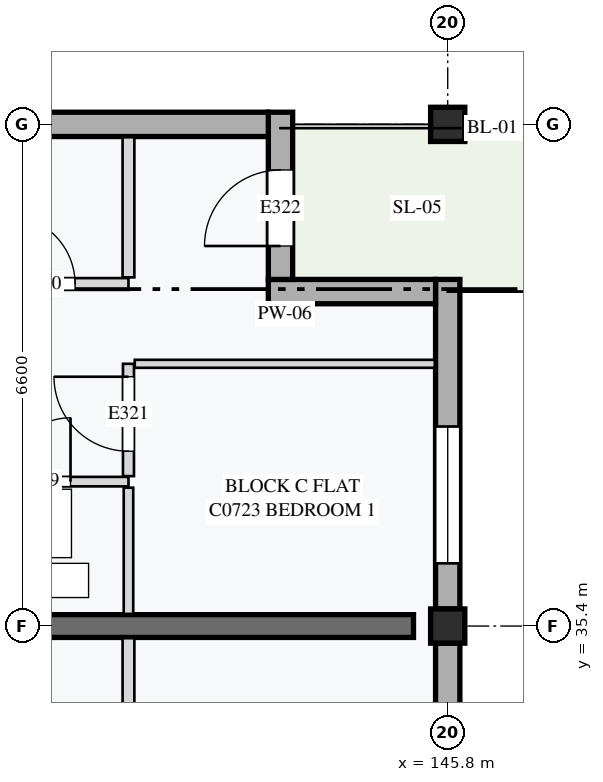
"""IFC4 building model, lengths in metres.
Left out: names, types, materials, properties, quantities, classifications, styles, units other than length and angle.
Written with IfcOpenShell. Run it as: python <this file> out.ifc"""

import sys

from ifc_helpers import new_model, si_unit, direction, frame, frame_2d, origin, origin_2d, place, context, subcontext, project, spatial, rectangle, extrude, element, fill, save


model = new_model("IFC4")
c1 = context("Model", 3, precision=1e-05, world=origin(), true_north=direction((0.0, 1.0)))
c2 = subcontext(c1, "Body", "Model", "MODEL_VIEW")
j1 = project(units=[si_unit("LENGTHUNIT", "METRE"), si_unit("PLANEANGLEUNIT", "RADIAN")], contexts=[c1])
p1 = place(None, origin())
s1 = spatial("IfcSite", under=j1, at=p1, CompositionType="ELEMENT")
p2 = place(p1, origin())
s2 = spatial("IfcBuilding", under=s1, at=p2, CompositionType="ELEMENT")
p3 = place(p2, frame((0.0, 0.0, 24.4)))
s3 = spatial("IfcBuildingStorey", under=s2, at=p3, CompositionType="ELEMENT", Elevation=24.4)
for number, where, z_axis, x_axis in (
    (1, (145.8, 35.4, 0.0), (0.0, 0.0, 1.0), (1.0, 0.0, 0.0)),
    (2, (145.8, 42.0, 0.0), (0.0, 0.0, 1.0), (1.0, 0.0, 0.0)),
):
    element("IfcColumn", number, at=place(p3, frame(where, z_axis=z_axis, x_axis=x_axis)), inside=s3, PredefinedType="COLUMN", context=c2, shape_type="SweptSolid", body=[
        extrude(rectangle(XDim=0.45, YDim=0.45, at=origin_2d()), origin(), (0.0, 0.0, 1.0), 3.2),
    ])
p4 = place(p3, frame((139.65, 35.4, 0.0), z_axis=(0.0, 0.0, 1.0), x_axis=(1.0, 0.0, 0.0)))
e3 = element("IfcWall", 3, at=p4, inside=s3, PredefinedType="SHEAR", context=c2, shape_type="SweptSolid", body=[
    extrude(rectangle(XDim=5.7, YDim=0.3, at=frame_2d((2.85, 0.0))), origin(), (0.0, 0.0, 1.0), 2.97),
])
p5 = place(p3, frame((145.8, 29.025, 0.0), z_axis=(0.0, 0.0, 1.0), x_axis=(0.0, 1.0, 0.0)))
e4 = element("IfcWall", 4, at=p5, inside=s3, PredefinedType="STANDARD", context=c2, shape_type="SweptSolid", body=[
    extrude(rectangle(XDim=6.15, YDim=0.32, at=frame_2d((3.075, 0.0))), origin(), (0.0, 0.0, 1.0), 2.6),
])
p6 = place(p5, frame((2.471, 0.0, 0.85)))
e5 = element("IfcOpeningElement", 5, at=p6, cuts=e4, PredefinedType="OPENING", context=c2, shape_type="SweptSolid", body=[
    extrude(rectangle(XDim=2.1, YDim=1.55, at=frame_2d((1.05, 0.775))), frame((0.0, 0.17, 0.0), z_axis=(0.0, -1.0, 0.0), x_axis=(1.0, 0.0, 0.0)), (0.0, 0.0, 1.0), 0.34),
])
p7 = place(p3, frame((145.8, 35.625, 0.0), z_axis=(0.0, 0.0, 1.0), x_axis=(0.0, 1.0, 0.0)))
e6 = element("IfcWall", 6, at=p7, inside=s3, PredefinedType="STANDARD", context=c2, shape_type="SweptSolid", body=[
    extrude(rectangle(XDim=4.335, YDim=0.32, at=frame_2d((2.167, 0.0))), origin(), (0.0, 0.0, 1.0), 2.6),
])
p8 = place(p7, frame((0.6, 0.0, 0.85)))
e7 = element("IfcOpeningElement", 7, at=p8, cuts=e6, PredefinedType="OPENING", context=c2, shape_type="SweptSolid", body=[
    extrude(rectangle(XDim=1.8, YDim=1.35, at=frame_2d((0.9, 0.675))), frame((0.0, 0.17, 0.0), z_axis=(0.0, -1.0, 0.0), x_axis=(1.0, 0.0, 0.0)), (0.0, 0.0, 1.0), 0.34),
])
p9 = place(p3, frame((145.64, 39.8, 0.0), z_axis=(0.0, 0.0, 1.0), x_axis=(-1.0, 0.0, 0.0)))
e8 = element("IfcWall", 8, at=p9, inside=s3, PredefinedType="STANDARD", context=c2, shape_type="SweptSolid", body=[
    extrude(rectangle(XDim=2.2, YDim=0.32, at=frame_2d((1.1, 0.0))), origin(), (0.0, 0.0, 1.0), 2.97),
])
p10 = place(p3, frame((143.6, 39.96, 0.0), z_axis=(0.0, 0.0, 1.0), x_axis=(0.0, 1.0, 0.0)))
e9 = element("IfcWall", 9, at=p10, inside=s3, PredefinedType="STANDARD", context=c2, shape_type="SweptSolid", body=[
    extrude(rectangle(XDim=2.2, YDim=0.32, at=frame_2d((1.1, 0.0))), origin(), (0.0, 0.0, 1.0), 2.97),
])
p11 = place(p10, frame((0.44, 0.0, 0.0)))
e10 = element("IfcOpeningElement", 10, at=p11, cuts=e9, PredefinedType="OPENING", context=c2, shape_type="SweptSolid", body=[
    extrude(rectangle(XDim=1.0, YDim=2.15, at=frame_2d((0.5, 1.075))), frame((0.0, 0.17, 0.0), z_axis=(0.0, -1.0, 0.0), x_axis=(1.0, 0.0, 0.0)), (0.0, 0.0, 1.0), 0.34),
])
p12 = place(p3, frame((139.425, 42.0, 0.0), z_axis=(0.0, 0.0, 1.0), x_axis=(1.0, 0.0, 0.0)))
e11 = element("IfcWall", 11, at=p12, inside=s3, PredefinedType="STANDARD", context=c2, shape_type="SweptSolid", body=[
    extrude(rectangle(XDim=4.015, YDim=0.32, at=frame_2d((2.007, 0.0))), origin(), (0.0, 0.0, 1.0), 2.65),
])
p13 = place(p3, frame((141.6, 33.387, 0.0), z_axis=(0.0, 0.0, 1.0), x_axis=(0.0, 1.0, 0.0)))
e12 = element("IfcWall", 12, at=p13, inside=s3, PredefinedType="PARTITIONING", context=c2, shape_type="SweptSolid", body=[
    extrude(rectangle(XDim=1.853, YDim=0.155, at=frame_2d((0.926, 0.0))), origin(), (0.0, 0.0, 1.0), 2.97),
])
p14 = place(p3, frame((139.298, 37.3, 0.0), z_axis=(0.0, 0.0, 1.0), x_axis=(1.0, 0.0, 0.0)))
e13 = element("IfcWall", 13, at=p14, inside=s3, PredefinedType="PARTITIONING", context=c2, shape_type="SweptSolid", body=[
    extrude(rectangle(XDim=2.302, YDim=0.125, at=frame_2d((1.151, 0.0))), origin(), (0.0, 0.0, 1.0), 2.97),
])
p15 = place(p14, frame((0.7, 0.0, 0.0)))
e14 = element("IfcOpeningElement", 14, at=p15, cuts=e13, PredefinedType="OPENING", context=c2, shape_type="SweptSolid", body=[
    extrude(rectangle(XDim=0.84, YDim=2.06, at=frame_2d((0.42, 1.03))), frame((0.0, 0.073, 0.0), z_axis=(0.0, -1.0, 0.0), x_axis=(1.0, 0.0, 0.0)), (0.0, 0.0, 1.0), 0.145),
])
p16 = place(p3, frame((141.6, 35.56, 0.0), z_axis=(0.0, 0.0, 1.0), x_axis=(0.0, 1.0, 0.0)))
e15 = element("IfcWall", 15, at=p16, inside=s3, PredefinedType="PARTITIONING", context=c2, shape_type="SweptSolid", body=[
    extrude(rectangle(XDim=1.66, YDim=0.125, at=frame_2d((0.83, 0.0))), origin(), (0.0, 0.0, 1.0), 2.97),
])
p17 = place(p3, frame((139.298, 39.9, 0.0), z_axis=(0.0, 0.0, 1.0), x_axis=(1.0, 0.0, 0.0)))
e16 = element("IfcWall", 16, at=p17, inside=s3, PredefinedType="PARTITIONING", context=c2, shape_type="SweptSolid", body=[
    extrude(rectangle(XDim=2.302, YDim=0.155, at=frame_2d((1.151, 0.0))), origin(), (0.0, 0.0, 1.0), 2.97),
])
p18 = place(p17, frame((0.7, 0.0, 0.0)))
e17 = element("IfcOpeningElement", 17, at=p18, cuts=e16, PredefinedType="OPENING", context=c2, shape_type="SweptSolid", body=[
    extrude(rectangle(XDim=0.9, YDim=2.16, at=frame_2d((0.45, 1.08))), frame((0.0, 0.087, 0.0), z_axis=(0.0, -1.0, 0.0), x_axis=(1.0, 0.0, 0.0)), (0.0, 0.0, 1.0), 0.175),
])
p19 = place(p3, frame((141.6, 39.988, 0.0), z_axis=(0.0, 0.0, 1.0), x_axis=(0.0, 1.0, 0.0)))
e18 = element("IfcWall", 18, at=p19, inside=s3, PredefinedType="PARTITIONING", context=c2, shape_type="SweptSolid", body=[
    extrude(rectangle(XDim=1.843, YDim=0.155, at=frame_2d((0.921, 0.0))), origin(), (0.0, 0.0, 1.0), 2.97),
])
p20 = place(p3, frame((141.6, 37.373, 0.0), z_axis=(0.0, 0.0, 1.0), x_axis=(0.0, 1.0, 0.0)))
e19 = element("IfcWall", 19, at=p20, inside=s3, PredefinedType="PARTITIONING", context=c2, shape_type="SweptSolid", body=[
    extrude(rectangle(XDim=1.478, YDim=0.145, at=frame_2d((0.739, 0.0))), origin(), (0.0, 0.0, 1.0), 2.97),
])
p21 = place(p20, frame((0.327, 0.0, 0.0)))
e20 = element("IfcOpeningElement", 20, at=p21, cuts=e19, PredefinedType="OPENING", context=c2, shape_type="SweptSolid", body=[
    extrude(rectangle(XDim=0.98, YDim=2.12, at=frame_2d((0.49, 1.06))), frame((0.0, 0.083, 0.0), z_axis=(0.0, -1.0, 0.0), x_axis=(1.0, 0.0, 0.0)), (0.0, 0.0, 1.0), 0.165),
])
p22 = place(p3, frame((141.683, 38.85, 0.0), z_axis=(0.0, 0.0, 1.0), x_axis=(1.0, 0.0, 0.0)))
e21 = element("IfcWall", 21, at=p22, inside=s3, PredefinedType="PARTITIONING", context=c2, shape_type="SweptSolid", body=[
    extrude(rectangle(XDim=3.947, YDim=0.105, at=frame_2d((1.974, 0.0))), origin(), (0.0, 0.0, 1.0), 2.97),
])
p23 = place(p8, origin())
e22 = element("IfcWindow", 22, at=p23, inside=s3, PartitioningType="SINGLE_PANEL", PredefinedType="WINDOW", context=c2, shape_type="SweptSolid", body=[
    extrude(rectangle(XDim=1.8, YDim=1.35, at=frame_2d((0.9, 0.675))), frame((0.0, 0.03, 0.0), z_axis=(0.0, -1.0, 0.0), x_axis=(1.0, 0.0, 0.0)), (0.0, 0.0, 1.0), 0.06),
])
fill(e7, e22)
p24 = place(p11, origin())
e23 = element("IfcDoor", 23, at=p24, inside=s3, OperationType="SINGLE_SWING_LEFT", PredefinedType="DOOR", context=c2, shape_type="SweptSolid", body=[
    extrude(rectangle(XDim=1.0, YDim=2.15, at=frame_2d((0.5, 1.075))), frame((0.0, 0.025, 0.0), z_axis=(0.0, -1.0, 0.0), x_axis=(1.0, 0.0, 0.0)), (0.0, 0.0, 1.0), 0.05),
])
fill(e10, e23)
p25 = place(p15, origin())
e24 = element("IfcDoor", 24, at=p25, inside=s3, OperationType="SINGLE_SWING_RIGHT", PredefinedType="DOOR", context=c2, shape_type="SweptSolid", body=[
    extrude(rectangle(XDim=0.84, YDim=2.06, at=frame_2d((0.42, 1.03))), frame((0.0, 0.025, 0.0), z_axis=(0.0, -1.0, 0.0), x_axis=(1.0, 0.0, 0.0)), (0.0, 0.0, 1.0), 0.05),
])
fill(e14, e24)
p26 = place(p18, origin())
e25 = element("IfcDoor", 25, at=p26, inside=s3, OperationType="SINGLE_SWING_LEFT", PredefinedType="DOOR", context=c2, shape_type="SweptSolid", body=[
    extrude(rectangle(XDim=0.9, YDim=2.16, at=frame_2d((0.45, 1.08))), frame((0.0, 0.025, 0.0), z_axis=(0.0, -1.0, 0.0), x_axis=(1.0, 0.0, 0.0)), (0.0, 0.0, 1.0), 0.05),
])
fill(e17, e25)
p27 = place(p21, origin())
e26 = element("IfcDoor", 26, at=p27, inside=s3, OperationType="SINGLE_SWING_RIGHT", PredefinedType="DOOR", context=c2, shape_type="SweptSolid", body=[
    extrude(rectangle(XDim=0.98, YDim=2.12, at=frame_2d((0.49, 1.06))), frame((0.0, 0.025, 0.0), z_axis=(0.0, -1.0, 0.0), x_axis=(1.0, 0.0, 0.0)), (0.0, 0.0, 1.0), 0.05),
])
fill(e20, e26)
save(model, sys.argv[1])
